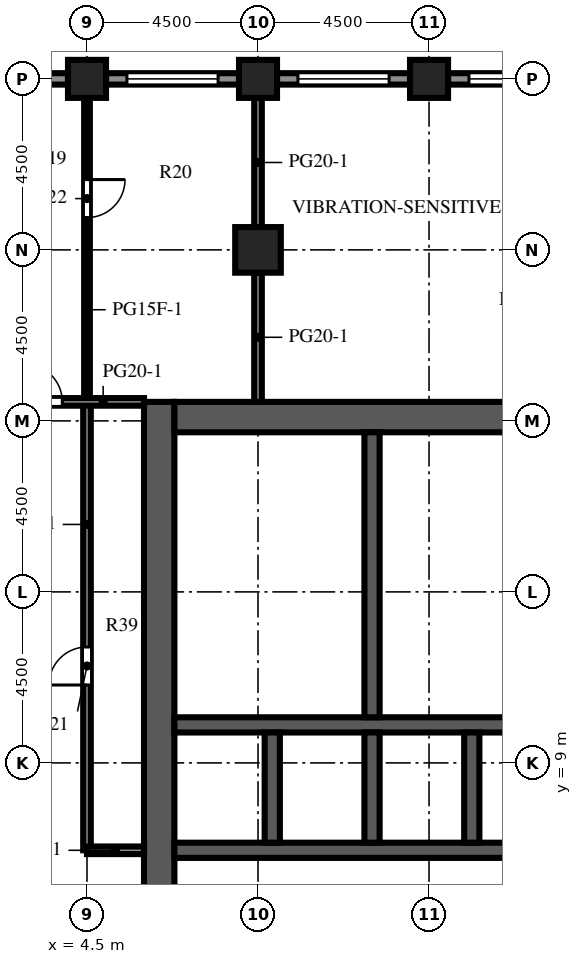
"""IFC4 building model, lengths in metres.
Left out: names, types, materials, properties, quantities, classifications, styles, units other than length and angle.
Written with IfcOpenShell. Run it as: python <this file> out.ifc"""

import sys

from ifc_helpers import new_model, si_unit, direction, frame, frame_2d, origin, origin_2d, place, context, subcontext, project, spatial, rectangle, extrude, element, fill, save


model = new_model("IFC4")
c1 = context("Model", 3, precision=1e-05, world=origin(), true_north=direction((0.0, 1.0)))
c2 = subcontext(c1, "Body", "Model", "MODEL_VIEW")
j1 = project(units=[si_unit("LENGTHUNIT", "METRE"), si_unit("PLANEANGLEUNIT", "RADIAN")], contexts=[c1])
p1 = place(None, origin())
s1 = spatial("IfcSite", under=j1, at=p1, CompositionType="ELEMENT")
p2 = place(p1, origin())
s2 = spatial("IfcBuilding", under=s1, at=p2, CompositionType="ELEMENT")
p3 = place(p2, frame((0.0, 0.0, 212.0)))
s3 = spatial("IfcBuildingStorey", under=s2, at=p3, CompositionType="ELEMENT", Elevation=212.0)
for number, where, z_axis, x_axis in (
    (1, (4.5, 27.0, 0.0), (0.0, 0.0, 1.0), (1.0, 0.0, 0.0)),
    (2, (9.0, 27.0, 0.0), (0.0, 0.0, 1.0), (1.0, 0.0, 0.0)),
    (3, (13.5, 27.0, 0.0), (0.0, 0.0, 1.0), (1.0, 0.0, 0.0)),
):
    element("IfcColumn", number, at=place(p3, frame(where, z_axis=z_axis, x_axis=x_axis)), inside=s3, PredefinedType="COLUMN", context=c2, shape_type="SweptSolid", body=[
        extrude(rectangle(XDim=1.0, YDim=1.0, at=origin_2d()), origin(), (0.0, 0.0, 1.0), 4.1),
    ])
p4 = place(p3, frame((9.0, 22.5, 0.0), z_axis=(0.0, 0.0, 1.0), x_axis=(1.0, 0.0, 0.0)))
e4 = element("IfcColumn", 4, at=p4, inside=s3, PredefinedType="COLUMN", context=c2, shape_type="SweptSolid", body=[
    extrude(rectangle(XDim=1.2, YDim=1.2, at=origin_2d()), origin(), (0.0, 0.0, 1.0), 4.1),
])
p5 = place(p3, frame((6.4, -9.0, 0.0), z_axis=(0.0, 0.0, 1.0), x_axis=(0.0, 1.0, 0.0)))
e5 = element("IfcWall", 5, at=p5, inside=s3, PredefinedType="SHEAR", context=c2, shape_type="SweptSolid", body=[
    extrude(rectangle(XDim=27.5, YDim=0.8, at=frame_2d((13.75, 0.0))), origin(), (0.0, 0.0, 1.0), 4.1),
])
p6 = place(p5, frame((12.55, 0.0, 0.0)))
e6 = element("IfcOpeningElement", 6, at=p6, cuts=e5, PredefinedType="OPENING", context=c2, shape_type="SweptSolid", body=[
    extrude(rectangle(XDim=2.4, YDim=2.4, at=frame_2d((1.2, 1.2))), frame((0.0, 0.41, 0.0), z_axis=(0.0, -1.0, 0.0), x_axis=(1.0, 0.0, 0.0)), (0.0, 0.0, 1.0), 0.82),
])
p7 = place(p5, frame((3.95, 0.0, 0.0)))
e7 = element("IfcOpeningElement", 7, at=p7, cuts=e5, PredefinedType="OPENING", context=c2, shape_type="SweptSolid", body=[
    extrude(rectangle(XDim=1.2, YDim=2.1, at=frame_2d((0.6, 1.05))), frame((0.0, 0.41, 0.0), z_axis=(0.0, -1.0, 0.0), x_axis=(1.0, 0.0, 0.0)), (0.0, 0.0, 1.0), 0.82),
])
p8 = place(p5, frame((22.35, 0.0, 0.0)))
e8 = element("IfcOpeningElement", 8, at=p8, cuts=e5, PredefinedType="OPENING", context=c2, shape_type="SweptSolid", body=[
    extrude(rectangle(XDim=1.2, YDim=2.1, at=frame_2d((0.6, 1.05))), frame((0.0, 0.41, 0.0), z_axis=(0.0, -1.0, 0.0), x_axis=(1.0, 0.0, 0.0)), (0.0, 0.0, 1.0), 0.82),
])
p9 = place(p3, frame((6.8, 18.1, 0.0), z_axis=(0.0, 0.0, 1.0), x_axis=(1.0, 0.0, 0.0)))
e9 = element("IfcWall", 9, at=p9, inside=s3, PredefinedType="SHEAR", context=c2, shape_type="SweptSolid", body=[
    extrude(rectangle(XDim=10.4, YDim=0.8, at=frame_2d((5.2, 0.0))), origin(), (0.0, 0.0, 1.0), 4.1),
])
p10 = place(p3, frame((6.8, 6.7, 0.0), z_axis=(0.0, 0.0, 1.0), x_axis=(1.0, 0.0, 0.0)))
e10 = element("IfcWall", 10, at=p10, inside=s3, PredefinedType="SHEAR", context=c2, shape_type="SweptSolid", body=[
    extrude(rectangle(XDim=10.4, YDim=0.4, at=frame_2d((5.2, 0.0))), origin(), (0.0, 0.0, 1.0), 4.1),
])
p11 = place(p10, frame((3.337, 0.0, 0.0)))
e11 = element("IfcOpeningElement", 11, at=p11, cuts=e10, PredefinedType="OPENING", context=c2, shape_type="SweptSolid", body=[
    extrude(rectangle(XDim=1.1, YDim=2.1, at=frame_2d((0.55, 1.05))), frame((0.0, 0.21, 0.0), z_axis=(0.0, -1.0, 0.0), x_axis=(1.0, 0.0, 0.0)), (0.0, 0.0, 1.0), 0.42),
])
p12 = place(p10, frame((5.962, 0.0, 0.0)))
e12 = element("IfcOpeningElement", 12, at=p12, cuts=e10, PredefinedType="OPENING", context=c2, shape_type="SweptSolid", body=[
    extrude(rectangle(XDim=1.1, YDim=2.1, at=frame_2d((0.55, 1.05))), frame((0.0, 0.21, 0.0), z_axis=(0.0, -1.0, 0.0), x_axis=(1.0, 0.0, 0.0)), (0.0, 0.0, 1.0), 0.42),
])
p13 = place(p10, frame((8.663, 0.0, 0.0)))
e13 = element("IfcOpeningElement", 13, at=p13, cuts=e10, PredefinedType="OPENING", context=c2, shape_type="SweptSolid", body=[
    extrude(rectangle(XDim=1.1, YDim=2.1, at=frame_2d((0.55, 1.05))), frame((0.0, 0.21, 0.0), z_axis=(0.0, -1.0, 0.0), x_axis=(1.0, 0.0, 0.0)), (0.0, 0.0, 1.0), 0.42),
])
p14 = place(p10, frame((0.688, 0.0, 0.0)))
e14 = element("IfcOpeningElement", 14, at=p14, cuts=e10, PredefinedType="OPENING", context=c2, shape_type="SweptSolid", body=[
    extrude(rectangle(XDim=1.0, YDim=2.1, at=frame_2d((0.5, 1.05))), frame((0.0, 0.21, 0.0), z_axis=(0.0, -1.0, 0.0), x_axis=(1.0, 0.0, 0.0)), (0.0, 0.0, 1.0), 0.42),
])
p15 = place(p3, frame((6.8, 10.0, 0.0), z_axis=(0.0, 0.0, 1.0), x_axis=(1.0, 0.0, 0.0)))
e15 = element("IfcWall", 15, at=p15, inside=s3, PredefinedType="SHEAR", context=c2, shape_type="SweptSolid", body=[
    extrude(rectangle(XDim=10.4, YDim=0.4, at=frame_2d((5.2, 0.0))), origin(), (0.0, 0.0, 1.0), 4.1),
])
for number, where, z_axis, x_axis in (
    (16, (9.375, 6.9, 0.0), (0.0, 0.0, 1.0), (0.0, 1.0, 0.0)),
    (17, (12.0, 6.9, 0.0), (0.0, 0.0, 1.0), (0.0, 1.0, 0.0)),
    (18, (14.625, 6.9, 0.0), (0.0, 0.0, 1.0), (0.0, 1.0, 0.0)),
):
    element("IfcWall", number, at=place(p3, frame(where, z_axis=z_axis, x_axis=x_axis)), inside=s3, PredefinedType="SHEAR", context=c2, shape_type="SweptSolid", body=[
        extrude(rectangle(XDim=2.9, YDim=0.4, at=frame_2d((1.45, 0.0))), origin(), (0.0, 0.0, 1.0), 4.1),
    ])
p16 = place(p3, frame((12.0, 10.2, 0.0), z_axis=(0.0, 0.0, 1.0), x_axis=(0.0, 1.0, 0.0)))
e19 = element("IfcWall", 19, at=p16, inside=s3, PredefinedType="SHEAR", context=c2, shape_type="SweptSolid", body=[
    extrude(rectangle(XDim=7.5, YDim=0.4, at=frame_2d((3.75, 0.0))), origin(), (0.0, 0.0, 1.0), 4.1),
])
p17 = place(p3, frame((14.0, 27.0, 0.0), z_axis=(0.0, 0.0, 1.0), x_axis=(1.0, 0.0, 0.0)))
e20 = element("IfcWall", 20, at=p17, inside=s3, PredefinedType="SOLIDWALL", context=c2, shape_type="SweptSolid", body=[
    extrude(rectangle(XDim=3.5, YDim=0.3, at=frame_2d((1.75, 0.0))), origin(), (0.0, 0.0, 1.0), 2.85),
])
p18 = place(p17, frame((0.55, 0.0, 0.8)))
e21 = element("IfcOpeningElement", 21, at=p18, cuts=e20, PredefinedType="OPENING", context=c2, shape_type="SweptSolid", body=[
    extrude(rectangle(XDim=2.4, YDim=1.7, at=frame_2d((1.2, 0.85))), frame((0.0, 0.16, 0.0), z_axis=(0.0, -1.0, 0.0), x_axis=(1.0, 0.0, 0.0)), (0.0, 0.0, 1.0), 0.32),
])
p19 = place(p3, frame((9.5, 27.0, 0.0), z_axis=(0.0, 0.0, 1.0), x_axis=(1.0, 0.0, 0.0)))
e22 = element("IfcWall", 22, at=p19, inside=s3, PredefinedType="SOLIDWALL", context=c2, shape_type="SweptSolid", body=[
    extrude(rectangle(XDim=3.5, YDim=0.3, at=frame_2d((1.75, 0.0))), origin(), (0.0, 0.0, 1.0), 2.85),
])
p20 = place(p19, frame((0.55, 0.0, 0.8)))
e23 = element("IfcOpeningElement", 23, at=p20, cuts=e22, PredefinedType="OPENING", context=c2, shape_type="SweptSolid", body=[
    extrude(rectangle(XDim=2.4, YDim=1.7, at=frame_2d((1.2, 0.85))), frame((0.0, 0.16, 0.0), z_axis=(0.0, -1.0, 0.0), x_axis=(1.0, 0.0, 0.0)), (0.0, 0.0, 1.0), 0.32),
])
p21 = place(p3, frame((5.0, 27.0, 0.0), z_axis=(0.0, 0.0, 1.0), x_axis=(1.0, 0.0, 0.0)))
e24 = element("IfcWall", 24, at=p21, inside=s3, PredefinedType="SOLIDWALL", context=c2, shape_type="SweptSolid", body=[
    extrude(rectangle(XDim=3.5, YDim=0.3, at=frame_2d((1.75, 0.0))), origin(), (0.0, 0.0, 1.0), 2.85),
])
p22 = place(p21, frame((0.55, 0.0, 0.8)))
e25 = element("IfcOpeningElement", 25, at=p22, cuts=e24, PredefinedType="OPENING", context=c2, shape_type="SweptSolid", body=[
    extrude(rectangle(XDim=2.4, YDim=1.7, at=frame_2d((1.2, 0.85))), frame((0.0, 0.16, 0.0), z_axis=(0.0, -1.0, 0.0), x_axis=(1.0, 0.0, 0.0)), (0.0, 0.0, 1.0), 0.32),
])
p23 = place(p3, frame((0.5, 27.0, 0.0), z_axis=(0.0, 0.0, 1.0), x_axis=(1.0, 0.0, 0.0)))
e26 = element("IfcWall", 26, at=p23, inside=s3, PredefinedType="SOLIDWALL", context=c2, shape_type="SweptSolid", body=[
    extrude(rectangle(XDim=3.5, YDim=0.3, at=frame_2d((1.75, 0.0))), origin(), (0.0, 0.0, 1.0), 2.85),
])
p24 = place(p23, frame((0.55, 0.0, 0.8)))
e27 = element("IfcOpeningElement", 27, at=p24, cuts=e26, PredefinedType="OPENING", context=c2, shape_type="SweptSolid", body=[
    extrude(rectangle(XDim=2.4, YDim=1.7, at=frame_2d((1.2, 0.85))), frame((0.0, 0.16, 0.0), z_axis=(0.0, -1.0, 0.0), x_axis=(1.0, 0.0, 0.0)), (0.0, 0.0, 1.0), 0.32),
])
p25 = place(p3, frame((8.2, 10.2, 0.0), z_axis=(0.0, 0.0, 1.0), x_axis=(0.0, 1.0, 0.0)))
e28 = element("IfcWall", 28, at=p25, inside=s3, PredefinedType="PARTITIONING", context=c2, shape_type="SweptSolid", body=[
    extrude(rectangle(XDim=2.25, YDim=0.1, at=frame_2d((1.125, 0.0))), origin(), (0.0, 0.0, 1.0), 3.65),
])
p26 = place(p25, frame((0.625, 0.0, 0.0)))
e29 = element("IfcOpeningElement", 29, at=p26, cuts=e28, PredefinedType="OPENING", context=c2, shape_type="SweptSolid", body=[
    extrude(rectangle(XDim=1.0, YDim=2.1, at=frame_2d((0.5, 1.05))), frame((0.0, 0.06, 0.0), z_axis=(0.0, -1.0, 0.0), x_axis=(1.0, 0.0, 0.0)), (0.0, 0.0, 1.0), 0.12),
])
p27 = place(p3, frame((8.2, 12.45, 0.0), z_axis=(0.0, 0.0, 1.0), x_axis=(0.0, 1.0, 0.0)))
e30 = element("IfcWall", 30, at=p27, inside=s3, PredefinedType="PARTITIONING", context=c2, shape_type="SweptSolid", body=[
    extrude(rectangle(XDim=2.4, YDim=0.1, at=frame_2d((1.2, 0.0))), origin(), (0.0, 0.0, 1.0), 3.65),
])
p28 = place(p27, frame((0.7, 0.0, 0.0)))
e31 = element("IfcOpeningElement", 31, at=p28, cuts=e30, PredefinedType="OPENING", context=c2, shape_type="SweptSolid", body=[
    extrude(rectangle(XDim=1.0, YDim=2.1, at=frame_2d((0.5, 1.05))), frame((0.0, 0.06, 0.0), z_axis=(0.0, -1.0, 0.0), x_axis=(1.0, 0.0, 0.0)), (0.0, 0.0, 1.0), 0.12),
])
p29 = place(p3, frame((8.2, 14.85, 0.0), z_axis=(0.0, 0.0, 1.0), x_axis=(0.0, 1.0, 0.0)))
e32 = element("IfcWall", 32, at=p29, inside=s3, PredefinedType="PARTITIONING", context=c2, shape_type="SweptSolid", body=[
    extrude(rectangle(XDim=2.85, YDim=0.1, at=frame_2d((1.425, 0.0))), origin(), (0.0, 0.0, 1.0), 3.65),
])
p30 = place(p29, frame((0.925, 0.0, 0.0)))
e33 = element("IfcOpeningElement", 33, at=p30, cuts=e32, PredefinedType="OPENING", context=c2, shape_type="SweptSolid", body=[
    extrude(rectangle(XDim=1.0, YDim=2.1, at=frame_2d((0.5, 1.05))), frame((0.0, 0.06, 0.0), z_axis=(0.0, -1.0, 0.0), x_axis=(1.0, 0.0, 0.0)), (0.0, 0.0, 1.0), 0.12),
])
for number, where, z_axis, x_axis in (
    (34, (8.2, 12.45, 0.0), (0.0, 0.0, 1.0), (1.0, 0.0, 0.0)),
    (35, (8.2, 14.85, 0.0), (0.0, 0.0, 1.0), (1.0, 0.0, 0.0)),
):
    element("IfcWall", number, at=place(p3, frame(where, z_axis=z_axis, x_axis=x_axis)), inside=s3, PredefinedType="PARTITIONING", context=c2, shape_type="SweptSolid", body=[
        extrude(rectangle(XDim=3.6, YDim=0.1, at=frame_2d((1.8, 0.0))), origin(), (0.0, 0.0, 1.0), 3.65),
    ])
p31 = place(p3, frame((4.5, 26.5, 0.0), z_axis=(0.0, 0.0, 1.0), x_axis=(0.0, -1.0, 0.0)))
e36 = element("IfcWall", 36, at=p31, inside=s3, PredefinedType="PARTITIONING", context=c2, shape_type="SweptSolid", body=[
    extrude(rectangle(XDim=8.0, YDim=0.15, at=frame_2d((4.0, 0.0))), origin(), (0.0, 0.0, 1.0), 3.65),
])
p32 = place(p31, frame((2.15, 0.0, 0.0)))
e37 = element("IfcOpeningElement", 37, at=p32, cuts=e36, PredefinedType="OPENING", context=c2, shape_type="SweptSolid", body=[
    extrude(rectangle(XDim=1.0, YDim=2.1, at=frame_2d((0.5, 1.05))), frame((0.0, 0.085, 0.0), z_axis=(0.0, -1.0, 0.0), x_axis=(1.0, 0.0, 0.0)), (0.0, 0.0, 1.0), 0.17),
])
p33 = place(p3, frame((4.5, 18.5, 0.0), z_axis=(0.0, 0.0, 1.0), x_axis=(0.0, -1.0, 0.0)))
e38 = element("IfcWall", 38, at=p33, inside=s3, PredefinedType="PARTITIONING", context=c2, shape_type="SweptSolid", body=[
    extrude(rectangle(XDim=11.8, YDim=0.2, at=frame_2d((5.9, 0.0))), origin(), (0.0, 0.0, 1.0), 3.65),
])
p34 = place(p33, frame((6.45, 0.0, 0.0)))
e39 = element("IfcOpeningElement", 39, at=p34, cuts=e38, PredefinedType="OPENING", context=c2, shape_type="SweptSolid", body=[
    extrude(rectangle(XDim=1.0, YDim=2.1, at=frame_2d((0.5, 1.05))), frame((0.0, 0.11, 0.0), z_axis=(0.0, -1.0, 0.0), x_axis=(1.0, 0.0, 0.0)), (0.0, 0.0, 1.0), 0.22),
])
for number, where, z_axis, x_axis in (
    (40, (9.0, 18.5, 0.0), (0.0, 0.0, 1.0), (0.0, 1.0, 0.0)),
    (41, (9.0, 23.1, 0.0), (0.0, 0.0, 1.0), (0.0, 1.0, 0.0)),
):
    element("IfcWall", number, at=place(p3, frame(where, z_axis=z_axis, x_axis=x_axis)), inside=s3, PredefinedType="PARTITIONING", context=c2, shape_type="SweptSolid", body=[
        extrude(rectangle(XDim=3.4, YDim=0.2, at=frame_2d((1.7, 0.0))), origin(), (0.0, 0.0, 1.0), 3.65),
    ])
p35 = place(p3, frame((4.5, 6.7, 0.0), z_axis=(0.0, 0.0, 1.0), x_axis=(1.0, 0.0, 0.0)))
e42 = element("IfcWall", 42, at=p35, inside=s3, PredefinedType="PARTITIONING", context=c2, shape_type="SweptSolid", body=[
    extrude(rectangle(XDim=1.5, YDim=0.2, at=frame_2d((0.75, 0.0))), origin(), (0.0, 0.0, 1.0), 3.65),
])
p36 = place(p3, frame((1.5, 18.5, 0.0), z_axis=(0.0, 0.0, 1.0), x_axis=(1.0, 0.0, 0.0)))
e43 = element("IfcWall", 43, at=p36, inside=s3, PredefinedType="PARTITIONING", context=c2, shape_type="SweptSolid", body=[
    extrude(rectangle(XDim=4.5, YDim=0.2, at=frame_2d((2.25, 0.0))), origin(), (0.0, 0.0, 1.0), 3.65),
])
p37 = place(p36, frame((1.35, 0.0, 0.0)))
e44 = element("IfcOpeningElement", 44, at=p37, cuts=e43, PredefinedType="OPENING", context=c2, shape_type="SweptSolid", body=[
    extrude(rectangle(XDim=1.0, YDim=2.1, at=frame_2d((0.5, 1.05))), frame((0.0, 0.11, 0.0), z_axis=(0.0, -1.0, 0.0), x_axis=(1.0, 0.0, 0.0)), (0.0, 0.0, 1.0), 0.22),
])
p38 = place(p18, origin())
e45 = element("IfcWindow", 45, at=p38, inside=s3, PartitioningType="SINGLE_PANEL", PredefinedType="WINDOW", context=c2, shape_type="SweptSolid", body=[
    extrude(rectangle(XDim=2.4, YDim=1.7, at=frame_2d((1.2, 0.85))), frame((0.0, 0.03, 0.0), z_axis=(0.0, -1.0, 0.0), x_axis=(1.0, 0.0, 0.0)), (0.0, 0.0, 1.0), 0.06),
])
fill(e21, e45)
p39 = place(p20, origin())
e46 = element("IfcWindow", 46, at=p39, inside=s3, PartitioningType="SINGLE_PANEL", PredefinedType="WINDOW", context=c2, shape_type="SweptSolid", body=[
    extrude(rectangle(XDim=2.4, YDim=1.7, at=frame_2d((1.2, 0.85))), frame((0.0, 0.03, 0.0), z_axis=(0.0, -1.0, 0.0), x_axis=(1.0, 0.0, 0.0)), (0.0, 0.0, 1.0), 0.06),
])
fill(e23, e46)
p40 = place(p22, origin())
e47 = element("IfcWindow", 47, at=p40, inside=s3, PartitioningType="SINGLE_PANEL", PredefinedType="WINDOW", context=c2, shape_type="SweptSolid", body=[
    extrude(rectangle(XDim=2.4, YDim=1.7, at=frame_2d((1.2, 0.85))), frame((0.0, 0.03, 0.0), z_axis=(0.0, -1.0, 0.0), x_axis=(1.0, 0.0, 0.0)), (0.0, 0.0, 1.0), 0.06),
])
fill(e25, e47)
p41 = place(p11, origin())
e48 = element("IfcDoor", 48, at=p41, inside=s3, OperationType="DOUBLE_DOOR_SLIDING", PredefinedType="DOOR", context=c2, shape_type="SweptSolid", body=[
    extrude(rectangle(XDim=1.1, YDim=2.1, at=frame_2d((0.55, 1.05))), frame((0.0, 0.025, 0.0), z_axis=(0.0, -1.0, 0.0), x_axis=(1.0, 0.0, 0.0)), (0.0, 0.0, 1.0), 0.05),
])
fill(e11, e48)
p42 = place(p12, origin())
e49 = element("IfcDoor", 49, at=p42, inside=s3, OperationType="DOUBLE_DOOR_SLIDING", PredefinedType="DOOR", context=c2, shape_type="SweptSolid", body=[
    extrude(rectangle(XDim=1.1, YDim=2.1, at=frame_2d((0.55, 1.05))), frame((0.0, 0.025, 0.0), z_axis=(0.0, -1.0, 0.0), x_axis=(1.0, 0.0, 0.0)), (0.0, 0.0, 1.0), 0.05),
])
fill(e12, e49)
p43 = place(p6, origin())
e50 = element("IfcDoor", 50, at=p43, inside=s3, OperationType="DOUBLE_DOOR_DOUBLE_SWING", PredefinedType="DOOR", context=c2, shape_type="SweptSolid", body=[
    extrude(rectangle(XDim=2.4, YDim=2.4, at=frame_2d((1.2, 1.2))), frame((0.0, 0.025, 0.0), z_axis=(0.0, -1.0, 0.0), x_axis=(1.0, 0.0, 0.0)), (0.0, 0.0, 1.0), 0.05),
])
fill(e6, e50)
p44 = place(p14, origin())
e51 = element("IfcDoor", 51, at=p44, inside=s3, OperationType="SINGLE_SWING_LEFT", PredefinedType="DOOR", context=c2, shape_type="SweptSolid", body=[
    extrude(rectangle(XDim=1.0, YDim=2.1, at=frame_2d((0.5, 1.05))), frame((0.0, 0.025, 0.0), z_axis=(0.0, -1.0, 0.0), x_axis=(1.0, 0.0, 0.0)), (0.0, 0.0, 1.0), 0.05),
])
fill(e14, e51)
p45 = place(p8, origin())
e52 = element("IfcDoor", 52, at=p45, inside=s3, OperationType="SINGLE_SWING_RIGHT", PredefinedType="DOOR", context=c2, shape_type="SweptSolid", body=[
    extrude(rectangle(XDim=1.2, YDim=2.1, at=frame_2d((0.6, 1.05))), frame((0.0, -0.325, 0.0), z_axis=(0.0, -1.0, 0.0), x_axis=(1.0, 0.0, 0.0)), (0.0, 0.0, 1.0), 0.05),
])
fill(e8, e52)
p46 = place(p26, origin())
e53 = element("IfcDoor", 53, at=p46, inside=s3, OperationType="SINGLE_SWING_LEFT", PredefinedType="DOOR", context=c2, shape_type="SweptSolid", body=[
    extrude(rectangle(XDim=1.0, YDim=2.1, at=frame_2d((0.5, 1.05))), frame((0.0, 0.025, 0.0), z_axis=(0.0, -1.0, 0.0), x_axis=(1.0, 0.0, 0.0)), (0.0, 0.0, 1.0), 0.05),
])
fill(e29, e53)
p47 = place(p28, origin())
e54 = element("IfcDoor", 54, at=p47, inside=s3, OperationType="SINGLE_SWING_RIGHT", PredefinedType="DOOR", context=c2, shape_type="SweptSolid", body=[
    extrude(rectangle(XDim=1.0, YDim=2.1, at=frame_2d((0.5, 1.05))), frame((0.0, 0.025, 0.0), z_axis=(0.0, -1.0, 0.0), x_axis=(1.0, 0.0, 0.0)), (0.0, 0.0, 1.0), 0.05),
])
fill(e31, e54)
p48 = place(p30, origin())
e55 = element("IfcDoor", 55, at=p48, inside=s3, OperationType="SINGLE_SWING_LEFT", PredefinedType="DOOR", context=c2, shape_type="SweptSolid", body=[
    extrude(rectangle(XDim=1.0, YDim=2.1, at=frame_2d((0.5, 1.05))), frame((0.0, 0.025, 0.0), z_axis=(0.0, -1.0, 0.0), x_axis=(1.0, 0.0, 0.0)), (0.0, 0.0, 1.0), 0.05),
])
fill(e33, e55)
p49 = place(p34, origin())
e56 = element("IfcDoor", 56, at=p49, inside=s3, OperationType="SINGLE_SWING_RIGHT", PredefinedType="DOOR", context=c2, shape_type="SweptSolid", body=[
    extrude(rectangle(XDim=1.0, YDim=2.1, at=frame_2d((0.5, 1.05))), frame((0.0, 0.025, 0.0), z_axis=(0.0, -1.0, 0.0), x_axis=(1.0, 0.0, 0.0)), (0.0, 0.0, 1.0), 0.05),
])
fill(e39, e56)
p50 = place(p32, origin())
e57 = element("IfcDoor", 57, at=p50, inside=s3, OperationType="SINGLE_SWING_LEFT", PredefinedType="DOOR", context=c2, shape_type="SweptSolid", body=[
    extrude(rectangle(XDim=1.0, YDim=2.1, at=frame_2d((0.5, 1.05))), frame((0.0, 0.025, 0.0), z_axis=(0.0, -1.0, 0.0), x_axis=(1.0, 0.0, 0.0)), (0.0, 0.0, 1.0), 0.05),
])
fill(e37, e57)
p51 = place(p37, origin())
e58 = element("IfcDoor", 58, at=p51, inside=s3, OperationType="SINGLE_SWING_LEFT", PredefinedType="DOOR", context=c2, shape_type="SweptSolid", body=[
    extrude(rectangle(XDim=1.0, YDim=2.1, at=frame_2d((0.5, 1.05))), frame((0.0, 0.025, 0.0), z_axis=(0.0, -1.0, 0.0), x_axis=(1.0, 0.0, 0.0)), (0.0, 0.0, 1.0), 0.05),
])
fill(e44, e58)
save(model, sys.argv[1])
